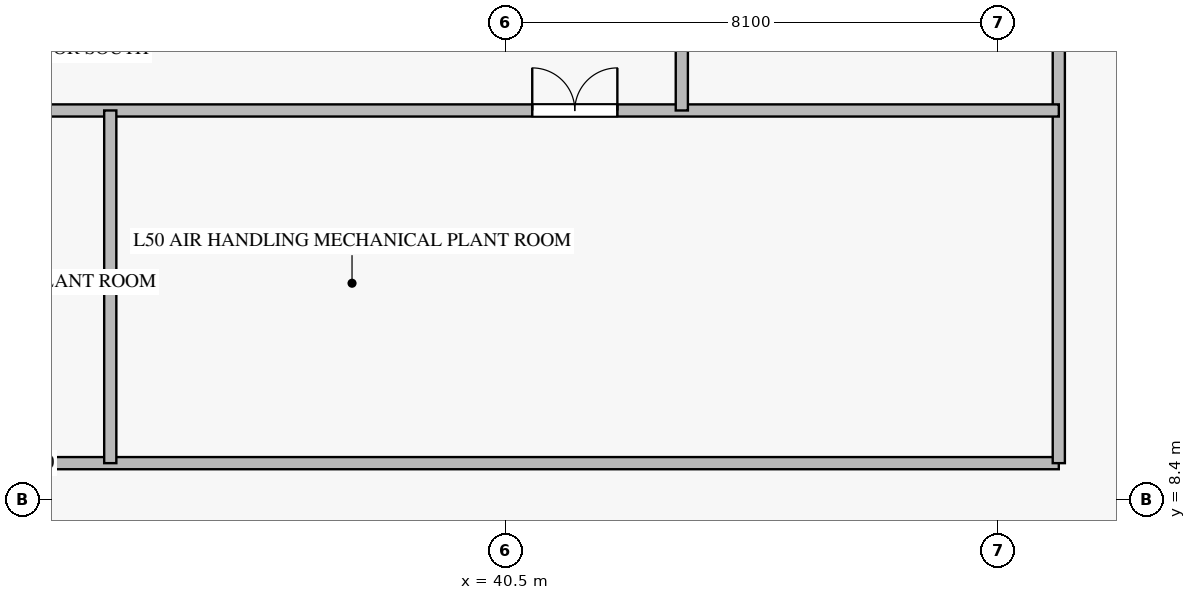
"""IFC4 building model, lengths in metres.
Left out: names, types, materials, properties, quantities, classifications, styles, units other than length and angle.
Written with IfcOpenShell. Run it as: python <this file> out.ifc"""

import sys

from ifc_helpers import new_model, si_unit, direction, frame, frame_2d, origin, place, context, subcontext, project, spatial, rectangle, extrude, source, transform, mapped, element, fill, save


model = new_model("IFC4")
c1 = context("Model", 3, precision=1e-05, world=origin(), true_north=direction((0.0, 1.0)))
c2 = subcontext(c1, "Body", "Model", "MODEL_VIEW")
j1 = project(units=[si_unit("LENGTHUNIT", "METRE"), si_unit("PLANEANGLEUNIT", "RADIAN")], contexts=[c1])
p1 = place(None, origin())
s1 = spatial("IfcSite", under=j1, at=p1, CompositionType="ELEMENT")
p2 = place(p1, origin())
s2 = spatial("IfcBuilding", under=s1, at=p2, CompositionType="ELEMENT")
p3 = place(p2, frame((0.0, 0.0, 198.9)))
s3 = spatial("IfcBuildingStorey", under=s2, at=p3, CompositionType="ELEMENT", Elevation=198.9)
p4 = place(p3, frame((15.2, 9.0, 0.0), z_axis=(0.0, 0.0, 1.0), x_axis=(1.0, 0.0, 0.0)))
e1 = element("IfcWall", 1, at=p4, inside=s3, PredefinedType="STANDARD", context=c2, shape_type="SweptSolid", body=[
    extrude(rectangle(XDim=34.4, YDim=0.2, at=frame_2d((17.2, 0.0))), origin(), (0.0, 0.0, 1.0), 5.64),
])
p5 = place(p3, frame((49.6, 9.0, 0.0), z_axis=(0.0, 0.0, 1.0), x_axis=(0.0, 1.0, 0.0)))
e2 = element("IfcWall", 2, at=p5, inside=s3, PredefinedType="STANDARD", context=c2, shape_type="SweptSolid", body=[
    extrude(rectangle(XDim=32.4, YDim=0.2, at=frame_2d((16.2, 0.0))), origin(), (0.0, 0.0, 1.0), 5.64),
])
p6 = place(p3, frame((15.2, 14.8, 0.0), z_axis=(0.0, 0.0, 1.0), x_axis=(1.0, 0.0, 0.0)))
e3 = element("IfcWall", 3, at=p6, inside=s3, PredefinedType="STANDARD", context=c2, shape_type="SweptSolid", body=[
    extrude(rectangle(XDim=34.4, YDim=0.2, at=frame_2d((17.2, 0.0))), origin(), (0.0, 0.0, 1.0), 5.64),
])
p7 = place(p6, frame((7.26, 0.0, 0.0)))
e4 = element("IfcOpeningElement", 4, at=p7, cuts=e3, PredefinedType="OPENING", context=c2, shape_type="SweptSolid", body=[
    extrude(rectangle(XDim=1.4, YDim=2.2, at=frame_2d((0.7, 1.1))), frame((0.0, 0.11, 0.0), z_axis=(0.0, -1.0, 0.0), x_axis=(1.0, 0.0, 0.0)), (0.0, 0.0, 1.0), 0.22),
])
p8 = place(p6, frame((25.74, 0.0, 0.0)))
e5 = element("IfcOpeningElement", 5, at=p8, cuts=e3, PredefinedType="OPENING", context=c2, shape_type="SweptSolid", body=[
    extrude(rectangle(XDim=1.4, YDim=2.2, at=frame_2d((0.7, 1.1))), frame((0.0, 0.11, 0.0), z_axis=(0.0, -1.0, 0.0), x_axis=(1.0, 0.0, 0.0)), (0.0, 0.0, 1.0), 0.22),
])
p9 = place(p3, frame((34.0, 9.0, 0.0), z_axis=(0.0, 0.0, 1.0), x_axis=(0.0, 1.0, 0.0)))
e6 = element("IfcWall", 6, at=p9, inside=s3, PredefinedType="STANDARD", context=c2, shape_type="SweptSolid", body=[
    extrude(rectangle(XDim=5.8, YDim=0.2, at=frame_2d((2.9, 0.0))), origin(), (0.0, 0.0, 1.0), 5.64),
])
p10 = place(p3, frame((43.4, 14.8, 0.0), z_axis=(0.0, 0.0, 1.0), x_axis=(0.0, 1.0, 0.0)))
e7 = element("IfcWall", 7, at=p10, inside=s3, PredefinedType="STANDARD", context=c2, shape_type="SweptSolid", body=[
    extrude(rectangle(XDim=8.85, YDim=0.2, at=frame_2d((4.425, 0.0))), origin(), (0.0, 0.0, 1.0), 5.64),
])
p11 = place(p10, frame((1.788, 0.0, 0.0)))
e8 = element("IfcOpeningElement", 8, at=p11, cuts=e7, PredefinedType="OPENING", context=c2, shape_type="SweptSolid", body=[
    extrude(rectangle(XDim=1.4, YDim=2.2, at=frame_2d((0.7, 1.1))), frame((0.0, 0.11, 0.0), z_axis=(0.0, -1.0, 0.0), x_axis=(1.0, 0.0, 0.0)), (0.0, 0.0, 1.0), 0.22),
])
m1 = source(origin(), c2, "Body", "SweptSolid", [
    extrude(rectangle(XDim=1.4, YDim=2.2, at=frame_2d((0.7, 1.1))), frame((0.0, 0.025, 0.0), z_axis=(0.0, -1.0, 0.0), x_axis=(1.0, 0.0, 0.0)), (0.0, 0.0, 1.0), 0.05),
])
p12 = place(p8, origin())
e9 = element("IfcDoor", 9, at=p12, inside=s3, OperationType="DOUBLE_DOOR_SINGLE_SWING", PredefinedType="DOOR", context=c2, shape_type="MappedRepresentation", body=[
    mapped(m1, transform((0.0, 0.0, 0.0), scale=1.0)),
])
fill(e5, e9)
save(model, sys.argv[1])
